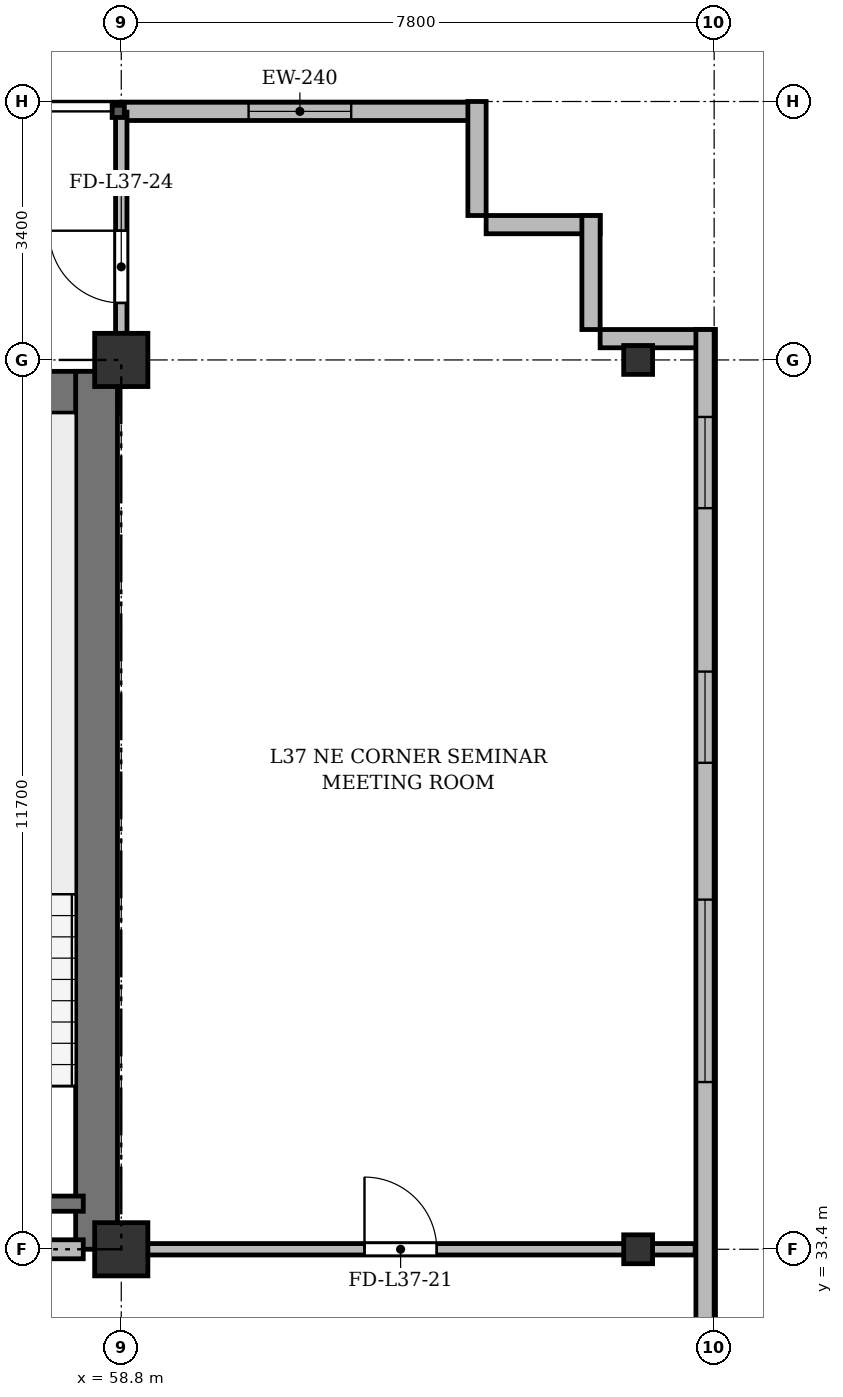
"""IFC4 building model, lengths in metres.
Left out: names, types, materials, properties, quantities, classifications, styles, units other than length and angle.
Written with IfcOpenShell. Run it as: python <this file> out.ifc"""

import sys

from ifc_helpers import new_model, si_unit, direction, frame, frame_2d, origin, origin_2d, place, context, subcontext, project, spatial, rectangle, i_section, extrude, source, transform, mapped, element, fill, save


model = new_model("IFC4")
c1 = context("Model", 3, precision=1e-05, world=origin(), true_north=direction((0.0, 1.0)))
c2 = subcontext(c1, "Body", "Model", "MODEL_VIEW")
j1 = project(units=[si_unit("LENGTHUNIT", "METRE"), si_unit("PLANEANGLEUNIT", "RADIAN")], contexts=[c1])
p1 = place(None, origin())
s1 = spatial("IfcSite", under=j1, at=p1, CompositionType="ELEMENT")
p2 = place(p1, origin())
s2 = spatial("IfcBuilding", under=s1, at=p2, CompositionType="ELEMENT")
p3 = place(p2, frame((0.0, 0.0, 142.9)))
s3 = spatial("IfcBuildingStorey", under=s2, at=p3, CompositionType="ELEMENT", Elevation=142.9)
m1 = source(origin(), c2, "Body", "SweptSolid", [
    extrude(rectangle(XDim=0.7, YDim=0.7, at=origin_2d()), origin(), (0.0, 0.0, 1.0), 3.6),
])
for number, where, z_axis, x_axis in (
    (1, (58.8, 33.4, 0.0), (0.0, 0.0, 1.0), (1.0, 0.0, 0.0)),
    (2, (58.8, 45.1, 0.0), (0.0, 0.0, 1.0), (1.0, 0.0, 0.0)),
):
    element("IfcColumn", number, at=place(p3, frame(where, z_axis=z_axis, x_axis=x_axis)), inside=s3, PredefinedType="COLUMN", context=c2, shape_type="MappedRepresentation", body=[
        mapped(m1, transform((0.0, 0.0, 0.0), x_axis=(1.0, 0.0, 0.0), y_axis=(0.0, 1.0, 0.0), z_axis=(0.0, 0.0, 1.0), scale=1.0)),
    ])
m2 = source(origin(), c2, "Body", "SweptSolid", [
    extrude(i_section(OverallWidth=0.38, OverallDepth=0.38, WebThickness=0.02, FlangeThickness=0.03, at=origin_2d()), origin(), (0.0, 0.0, 1.0), 3.6),
])
for number, where, z_axis, x_axis in (
    (3, (65.6, 33.4, 0.0), (0.0, 0.0, 1.0), (1.0, 0.0, 0.0)),
    (4, (65.6, 45.1, 0.0), (0.0, 0.0, 1.0), (1.0, 0.0, 0.0)),
):
    element("IfcColumn", number, at=place(p3, frame(where, z_axis=z_axis, x_axis=x_axis)), inside=s3, PredefinedType="COLUMN", context=c2, shape_type="MappedRepresentation", body=[
        mapped(m2, transform((0.0, 0.0, 0.0), x_axis=(1.0, 0.0, 0.0), y_axis=(0.0, 1.0, 0.0), z_axis=(0.0, 0.0, 1.0), scale=1.0)),
    ])
p4 = place(p3, frame((58.8, 48.37, 0.0), z_axis=(0.0, 0.0, 1.0), x_axis=(1.0, 0.0, 0.0)))
e5 = element("IfcWall", 5, at=p4, inside=s3, PredefinedType="SOLIDWALL", context=c2, shape_type="SweptSolid", body=[
    extrude(rectangle(XDim=4.7, YDim=0.24, at=frame_2d((2.35, 0.0))), origin(), (0.0, 0.0, 1.0), 3.35),
])
p5 = place(p4, frame((1.675, 0.0, 0.9)))
e6 = element("IfcOpeningElement", 6, at=p5, cuts=e5, PredefinedType="OPENING", context=c2, shape_type="SweptSolid", body=[
    extrude(rectangle(XDim=1.35, YDim=1.5, at=frame_2d((0.675, 0.75))), frame((0.0, 0.13, 0.0), z_axis=(0.0, -1.0, 0.0), x_axis=(1.0, 0.0, 0.0)), (0.0, 0.0, 1.0), 0.26),
])
for number, where, z_axis, x_axis in (
    (7, (63.48, 48.5, 0.0), (0.0, 0.0, 1.0), (0.0, -1.0, 0.0)),
    (8, (63.6, 46.88, 0.0), (0.0, 0.0, 1.0), (1.0, 0.0, 0.0)),
    (9, (64.98, 47.0, 0.0), (0.0, 0.0, 1.0), (0.0, -1.0, 0.0)),
    (10, (65.1, 45.38, 0.0), (0.0, 0.0, 1.0), (1.0, 0.0, 0.0)),
):
    element("IfcWall", number, at=place(p3, frame(where, z_axis=z_axis, x_axis=x_axis)), inside=s3, PredefinedType="SOLIDWALL", context=c2, shape_type="SweptSolid", body=[
        extrude(rectangle(XDim=1.5, YDim=0.24, at=frame_2d((0.75, 0.0))), origin(), (0.0, 0.0, 1.0), 3.35),
    ])
p6 = place(p3, frame((66.48, 45.5, 0.0), z_axis=(0.0, 0.0, 1.0), x_axis=(0.0, -1.0, 0.0)))
e11 = element("IfcWall", 11, at=p6, inside=s3, PredefinedType="SOLIDWALL", context=c2, shape_type="SweptSolid", body=[
    extrude(rectangle(XDim=39.2, YDim=0.24, at=frame_2d((19.6, 0.0))), origin(), (0.0, 0.0, 1.0), 3.35),
])
p7 = place(p6, frame((36.55, 0.0, 0.92)))
e12 = element("IfcOpeningElement", 12, at=p7, cuts=e11, PredefinedType="OPENING", context=c2, shape_type="SweptSolid", body=[
    extrude(rectangle(XDim=1.2, YDim=1.65, at=frame_2d((0.6, 0.825))), frame((0.0, 0.13, 0.0), z_axis=(0.0, -1.0, 0.0), x_axis=(1.0, 0.0, 0.0)), (0.0, 0.0, 1.0), 0.26),
])
p8 = place(p6, frame((32.9, 0.0, 0.92)))
e13 = element("IfcOpeningElement", 13, at=p8, cuts=e11, PredefinedType="OPENING", context=c2, shape_type="SweptSolid", body=[
    extrude(rectangle(XDim=2.4, YDim=2.1, at=frame_2d((1.2, 1.05))), frame((0.0, 0.13, 0.0), z_axis=(0.0, -1.0, 0.0), x_axis=(1.0, 0.0, 0.0)), (0.0, 0.0, 1.0), 0.26),
])
p9 = place(p6, frame((28.7, 0.0, 0.92)))
e14 = element("IfcOpeningElement", 14, at=p9, cuts=e11, PredefinedType="OPENING", context=c2, shape_type="SweptSolid", body=[
    extrude(rectangle(XDim=2.4, YDim=2.1, at=frame_2d((1.2, 1.05))), frame((0.0, 0.13, 0.0), z_axis=(0.0, -1.0, 0.0), x_axis=(1.0, 0.0, 0.0)), (0.0, 0.0, 1.0), 0.26),
])
p10 = place(p6, frame((21.5, 0.0, 0.92)))
e15 = element("IfcOpeningElement", 15, at=p10, cuts=e11, PredefinedType="OPENING", context=c2, shape_type="SweptSolid", body=[
    extrude(rectangle(XDim=2.4, YDim=2.1, at=frame_2d((1.2, 1.05))), frame((0.0, 0.13, 0.0), z_axis=(0.0, -1.0, 0.0), x_axis=(1.0, 0.0, 0.0)), (0.0, 0.0, 1.0), 0.26),
])
p11 = place(p6, frame((7.5, 0.0, 0.92)))
e16 = element("IfcOpeningElement", 16, at=p11, cuts=e11, PredefinedType="OPENING", context=c2, shape_type="SweptSolid", body=[
    extrude(rectangle(XDim=2.4, YDim=2.1, at=frame_2d((1.2, 1.05))), frame((0.0, 0.13, 0.0), z_axis=(0.0, -1.0, 0.0), x_axis=(1.0, 0.0, 0.0)), (0.0, 0.0, 1.0), 0.26),
])
p12 = place(p6, frame((4.5, 0.0, 0.92)))
e17 = element("IfcOpeningElement", 17, at=p12, cuts=e11, PredefinedType="OPENING", context=c2, shape_type="SweptSolid", body=[
    extrude(rectangle(XDim=1.2, YDim=1.65, at=frame_2d((0.6, 0.825))), frame((0.0, 0.13, 0.0), z_axis=(0.0, -1.0, 0.0), x_axis=(1.0, 0.0, 0.0)), (0.0, 0.0, 1.0), 0.26),
])
p13 = place(p6, frame((1.15, 0.0, 0.92)))
e18 = element("IfcOpeningElement", 18, at=p13, cuts=e11, PredefinedType="OPENING", context=c2, shape_type="SweptSolid", body=[
    extrude(rectangle(XDim=1.2, YDim=1.65, at=frame_2d((0.6, 0.825))), frame((0.0, 0.13, 0.0), z_axis=(0.0, -1.0, 0.0), x_axis=(1.0, 0.0, 0.0)), (0.0, 0.0, 1.0), 0.26),
])
p14 = place(p3, frame((15.65, 44.675, 0.0), z_axis=(0.0, 0.0, 1.0), x_axis=(1.0, 0.0, 0.0)))
e19 = element("IfcWall", 19, at=p14, inside=s3, PredefinedType="SHEAR", context=c2, shape_type="SweptSolid", body=[
    extrude(rectangle(XDim=43.1, YDim=0.55, at=frame_2d((21.55, 0.0))), origin(), (0.0, 0.0, 1.0), 3.35),
])
p15 = place(p3, frame((58.475, 33.4, 0.0), z_axis=(0.0, 0.0, 1.0), x_axis=(0.0, 1.0, 0.0)))
e20 = element("IfcWall", 20, at=p15, inside=s3, PredefinedType="SHEAR", context=c2, shape_type="SweptSolid", body=[
    extrude(rectangle(XDim=11.55, YDim=0.55, at=frame_2d((5.775, 0.0))), origin(), (0.0, 0.0, 1.0), 3.35),
])
p16 = place(p3, frame((54.9, 34.0, 0.0), z_axis=(0.0, 0.0, 1.0), x_axis=(1.0, 0.0, 0.0)))
e21 = element("IfcWall", 21, at=p16, inside=s3, PredefinedType="SHEAR", context=c2, shape_type="SweptSolid", body=[
    extrude(rectangle(XDim=3.4, YDim=0.2, at=frame_2d((1.7, 0.0))), origin(), (0.0, 0.0, 1.0), 3.35),
])
p17 = place(p3, frame((47.15, 33.4, 0.0), z_axis=(0.0, 0.0, 1.0), x_axis=(1.0, 0.0, 0.0)))
e22 = element("IfcWall", 22, at=p17, inside=s3, PredefinedType="PARTITIONING", context=c2, shape_type="SweptSolid", body=[
    extrude(rectangle(XDim=11.15, YDim=0.25, at=frame_2d((5.575, 0.0))), origin(), (0.0, 0.0, 1.0), 2.75),
])
p18 = place(p17, frame((0.7, 0.0, 0.0)))
e23 = element("IfcOpeningElement", 23, at=p18, cuts=e22, PredefinedType="OPENING", context=c2, shape_type="SweptSolid", body=[
    extrude(rectangle(XDim=0.95, YDim=2.15, at=frame_2d((0.475, 1.075))), frame((0.0, 0.135, 0.0), z_axis=(0.0, -1.0, 0.0), x_axis=(1.0, 0.0, 0.0)), (0.0, 0.0, 1.0), 0.27),
])
p19 = place(p17, frame((6.0, 0.0, 0.0)))
e24 = element("IfcOpeningElement", 24, at=p19, cuts=e22, PredefinedType="OPENING", context=c2, shape_type="SweptSolid", body=[
    extrude(rectangle(XDim=1.2, YDim=2.15, at=frame_2d((0.6, 1.075))), frame((0.0, 0.135, 0.0), z_axis=(0.0, -1.0, 0.0), x_axis=(1.0, 0.0, 0.0)), (0.0, 0.0, 1.0), 0.27),
])
p20 = place(p3, frame((58.8, 33.4, 0.0), z_axis=(0.0, 0.0, 1.0), x_axis=(1.0, 0.0, 0.0)))
e25 = element("IfcWall", 25, at=p20, inside=s3, PredefinedType="PARTITIONING", context=c2, shape_type="SweptSolid", body=[
    extrude(rectangle(XDim=7.55, YDim=0.15, at=frame_2d((3.775, 0.0))), origin(), (0.0, 0.0, 1.0), 2.75),
])
p21 = place(p20, frame((3.2, 0.0, 0.0)))
e26 = element("IfcOpeningElement", 26, at=p21, cuts=e25, PredefinedType="OPENING", context=c2, shape_type="SweptSolid", body=[
    extrude(rectangle(XDim=0.95, YDim=2.15, at=frame_2d((0.475, 1.075))), frame((0.0, 0.085, 0.0), z_axis=(0.0, -1.0, 0.0), x_axis=(1.0, 0.0, 0.0)), (0.0, 0.0, 1.0), 0.17),
])
p22 = place(p3, frame((58.8, 44.75, 0.0), z_axis=(0.0, 0.0, 1.0), x_axis=(0.0, 1.0, 0.0)))
e27 = element("IfcWall", 27, at=p22, inside=s3, PredefinedType="PARTITIONING", context=c2, shape_type="SweptSolid", body=[
    extrude(rectangle(XDim=3.61, YDim=0.15, at=frame_2d((1.805, 0.0))), origin(), (0.0, 0.0, 1.0), 2.85),
])
p23 = place(p22, frame((1.1, 0.0, 0.0)))
e28 = element("IfcOpeningElement", 28, at=p23, cuts=e27, PredefinedType="OPENING", context=c2, shape_type="SweptSolid", body=[
    extrude(rectangle(XDim=0.95, YDim=2.15, at=frame_2d((0.475, 1.075))), frame((0.0, 0.085, 0.0), z_axis=(0.0, -1.0, 0.0), x_axis=(1.0, 0.0, 0.0)), (0.0, 0.0, 1.0), 0.17),
])
m3 = source(origin(), c2, "Body", "SweptSolid", [
    extrude(rectangle(XDim=1.35, YDim=1.5, at=frame_2d((0.675, 0.75))), frame((0.0, 0.03, 0.0), z_axis=(0.0, -1.0, 0.0), x_axis=(1.0, 0.0, 0.0)), (0.0, 0.0, 1.0), 0.06),
])
p24 = place(p5, origin())
e29 = element("IfcWindow", 29, at=p24, inside=s3, PartitioningType="SINGLE_PANEL", PredefinedType="WINDOW", context=c2, shape_type="MappedRepresentation", body=[
    mapped(m3, transform((0.0, 0.0, 0.0), x_axis=(1.0, 0.0, 0.0), y_axis=(0.0, 1.0, 0.0), z_axis=(0.0, 0.0, 1.0), scale=1.0)),
])
fill(e6, e29)
m4 = source(origin(), c2, "Body", "SweptSolid", [
    extrude(rectangle(XDim=2.4, YDim=2.1, at=frame_2d((1.2, 1.05))), frame((0.0, 0.03, 0.0), z_axis=(0.0, -1.0, 0.0), x_axis=(1.0, 0.0, 0.0)), (0.0, 0.0, 1.0), 0.06),
])
p25 = place(p11, origin())
e30 = element("IfcWindow", 30, at=p25, inside=s3, PartitioningType="SINGLE_PANEL", PredefinedType="WINDOW", context=c2, shape_type="MappedRepresentation", body=[
    mapped(m4, transform((0.0, 0.0, 0.0), x_axis=(1.0, 0.0, 0.0), y_axis=(0.0, 1.0, 0.0), z_axis=(0.0, 0.0, 1.0), scale=1.0)),
])
fill(e16, e30)
m5 = source(origin(), c2, "Body", "SweptSolid", [
    extrude(rectangle(XDim=1.2, YDim=1.65, at=frame_2d((0.6, 0.825))), frame((0.0, 0.03, 0.0), z_axis=(0.0, -1.0, 0.0), x_axis=(1.0, 0.0, 0.0)), (0.0, 0.0, 1.0), 0.06),
])
p26 = place(p12, origin())
e31 = element("IfcWindow", 31, at=p26, inside=s3, PartitioningType="SINGLE_PANEL", PredefinedType="WINDOW", context=c2, shape_type="MappedRepresentation", body=[
    mapped(m5, transform((0.0, 0.0, 0.0), x_axis=(1.0, 0.0, 0.0), y_axis=(0.0, 1.0, 0.0), z_axis=(0.0, 0.0, 1.0), scale=1.0)),
])
fill(e17, e31)
p27 = place(p13, origin())
e32 = element("IfcWindow", 32, at=p27, inside=s3, PartitioningType="SINGLE_PANEL", PredefinedType="WINDOW", context=c2, shape_type="MappedRepresentation", body=[
    mapped(m5, transform((0.0, 0.0, 0.0), x_axis=(1.0, 0.0, 0.0), y_axis=(0.0, 1.0, 0.0), z_axis=(0.0, 0.0, 1.0), scale=1.0)),
])
fill(e18, e32)
m6 = source(origin(), c2, "Body", "SweptSolid", [
    extrude(rectangle(XDim=0.95, YDim=2.15, at=frame_2d((0.475, 1.075))), frame((0.0, 0.025, 0.0), z_axis=(0.0, -1.0, 0.0), x_axis=(1.0, 0.0, 0.0)), (0.0, 0.0, 1.0), 0.05),
])
p28 = place(p21, origin())
e33 = element("IfcDoor", 33, at=p28, inside=s3, OperationType="SINGLE_SWING_LEFT", PredefinedType="DOOR", context=c2, shape_type="MappedRepresentation", body=[
    mapped(m6, transform((0.0, 0.0, 0.0), x_axis=(1.0, 0.0, 0.0), y_axis=(0.0, 1.0, 0.0), z_axis=(0.0, 0.0, 1.0), scale=1.0)),
])
fill(e26, e33)
p29 = place(p23, origin())
e34 = element("IfcDoor", 34, at=p29, inside=s3, OperationType="SINGLE_SWING_RIGHT", PredefinedType="DOOR", context=c2, shape_type="MappedRepresentation", body=[
    mapped(m6, transform((0.0, 0.0, 0.0), x_axis=(1.0, 0.0, 0.0), y_axis=(0.0, 1.0, 0.0), z_axis=(0.0, 0.0, 1.0), scale=1.0)),
])
fill(e28, e34)
save(model, sys.argv[1])
